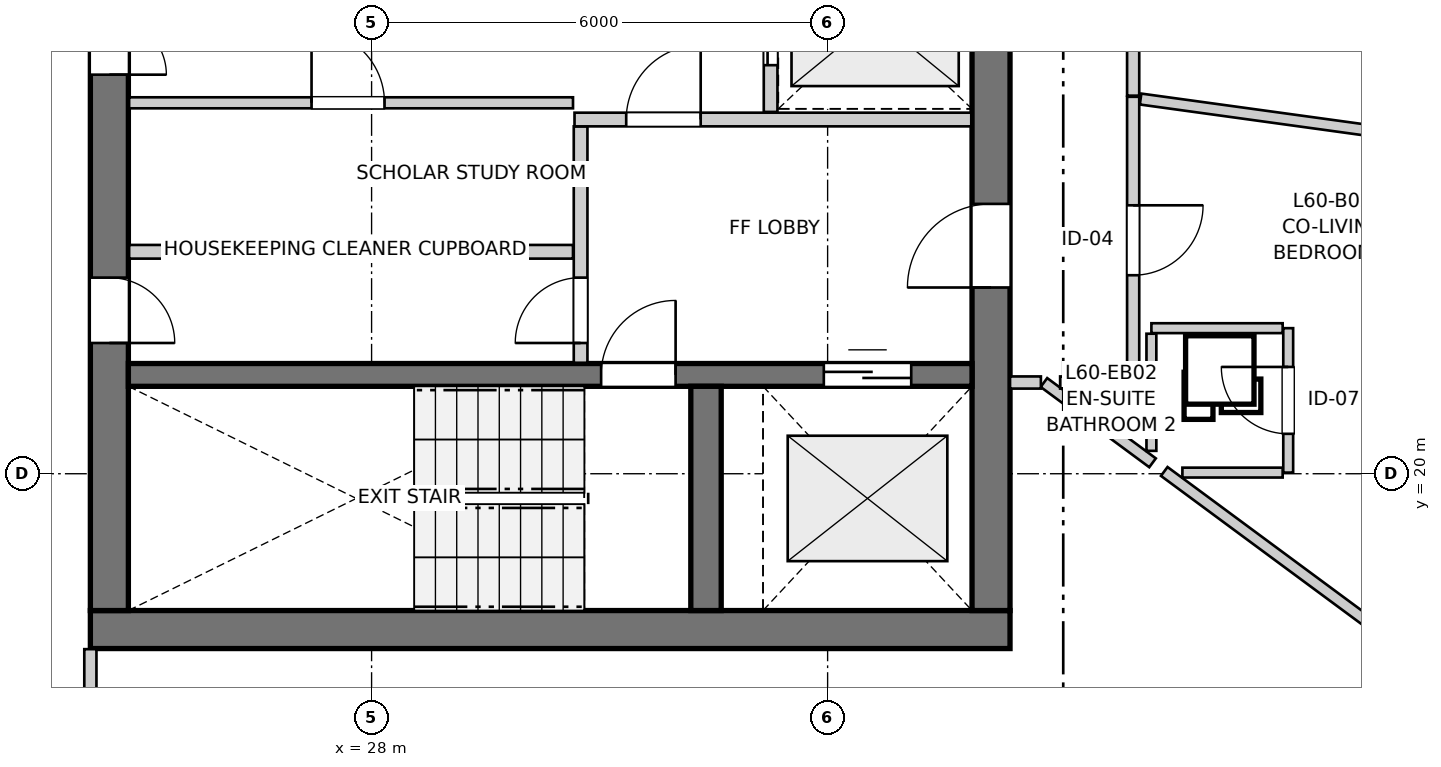
"""IFC4 building model, lengths in metres.
Left out: names, types, materials, properties, quantities, classifications, styles, units other than length and angle.
Written with IfcOpenShell. Run it as: python <this file> out.ifc"""

import sys

from ifc_helpers import new_model, si_unit, direction, frame, frame_2d, origin, place, context, subcontext, project, spatial, rectangle, extrude, source, transform, mapped, element, fill, save


model = new_model("IFC4")
c1 = context("Model", 3, precision=1e-05, world=origin(), true_north=direction((0.0, 1.0)))
c2 = subcontext(c1, "Body", "Model", "MODEL_VIEW")
j1 = project(units=[si_unit("LENGTHUNIT", "METRE"), si_unit("PLANEANGLEUNIT", "RADIAN")], contexts=[c1])
p1 = place(None, origin())
s1 = spatial("IfcSite", under=j1, at=p1, CompositionType="ELEMENT")
p2 = place(p1, origin())
s2 = spatial("IfcBuilding", under=s1, at=p2, CompositionType="ELEMENT")
p3 = place(p2, frame((0.0, 0.0, 202.0)))
s3 = spatial("IfcBuildingStorey", under=s2, at=p3, CompositionType="ELEMENT", Elevation=202.0)
p4 = place(p3, frame((24.3, 17.95, 0.0), z_axis=(0.0, 0.0, 1.0), x_axis=(1.0, 0.0, 0.0)))
e1 = element("IfcWall", 1, at=p4, inside=s3, PredefinedType="SHEAR", context=c2, shape_type="SweptSolid", body=[
    extrude(rectangle(XDim=12.1, YDim=0.5, at=frame_2d((6.05, 0.0))), origin(), (0.0, 0.0, 1.0), 2.935),
])
p5 = place(p3, frame((24.55, 33.8, 0.0), z_axis=(0.0, 0.0, 1.0), x_axis=(0.0, -1.0, 0.0)))
e2 = element("IfcWall", 2, at=p5, inside=s3, PredefinedType="SHEAR", context=c2, shape_type="SweptSolid", body=[
    extrude(rectangle(XDim=15.6, YDim=0.5, at=frame_2d((7.8, 0.0))), origin(), (0.0, 0.0, 1.0), 2.935),
])
p6 = place(p5, frame((7.05, 0.0, 0.0)))
e3 = element("IfcOpeningElement", 3, at=p6, cuts=e2, PredefinedType="OPENING", context=c2, shape_type="SweptSolid", body=[
    extrude(rectangle(XDim=1.5, YDim=2.15, at=frame_2d((0.75, 1.075))), frame((0.0, 0.26, 0.0), z_axis=(0.0, -1.0, 0.0), x_axis=(1.0, 0.0, 0.0)), (0.0, 0.0, 1.0), 0.52),
])
p7 = place(p5, frame((3.52, 0.0, 0.0)))
e4 = element("IfcOpeningElement", 4, at=p7, cuts=e2, PredefinedType="OPENING", context=c2, shape_type="SweptSolid", body=[
    extrude(rectangle(XDim=0.86, YDim=2.05, at=frame_2d((0.43, 1.025))), frame((0.0, 0.26, 0.0), z_axis=(0.0, -1.0, 0.0), x_axis=(1.0, 0.0, 0.0)), (0.0, 0.0, 1.0), 0.52),
])
p8 = place(p5, frame((11.22, 0.0, 0.0)))
e5 = element("IfcOpeningElement", 5, at=p8, cuts=e2, PredefinedType="OPENING", context=c2, shape_type="SweptSolid", body=[
    extrude(rectangle(XDim=0.86, YDim=2.05, at=frame_2d((0.43, 1.025))), frame((0.0, 0.26, 0.0), z_axis=(0.0, -1.0, 0.0), x_axis=(1.0, 0.0, 0.0)), (0.0, 0.0, 1.0), 0.52),
])
p9 = place(p3, frame((36.15, 18.2, 0.0), z_axis=(0.0, 0.0, 1.0), x_axis=(0.0, 1.0, 0.0)))
e6 = element("IfcWall", 6, at=p9, inside=s3, PredefinedType="SHEAR", context=c2, shape_type="SweptSolid", body=[
    extrude(rectangle(XDim=15.6, YDim=0.5, at=frame_2d((7.8, 0.0))), origin(), (0.0, 0.0, 1.0), 2.935),
])
p10 = place(p9, frame((4.25, 0.0, 0.0)))
e7 = element("IfcOpeningElement", 7, at=p10, cuts=e6, PredefinedType="OPENING", context=c2, shape_type="SweptSolid", body=[
    extrude(rectangle(XDim=1.1, YDim=2.15, at=frame_2d((0.55, 1.075))), frame((0.0, 0.26, 0.0), z_axis=(0.0, -1.0, 0.0), x_axis=(1.0, 0.0, 0.0)), (0.0, 0.0, 1.0), 0.52),
])
p11 = place(p9, frame((10.25, 0.0, 0.0)))
e8 = element("IfcOpeningElement", 8, at=p11, cuts=e6, PredefinedType="OPENING", context=c2, shape_type="SweptSolid", body=[
    extrude(rectangle(XDim=1.1, YDim=2.15, at=frame_2d((0.55, 1.075))), frame((0.0, 0.26, 0.0), z_axis=(0.0, -1.0, 0.0), x_axis=(1.0, 0.0, 0.0)), (0.0, 0.0, 1.0), 0.52),
])
p12 = place(p3, frame((24.8, 21.3, 0.0), z_axis=(0.0, 0.0, 1.0), x_axis=(1.0, 0.0, 0.0)))
e9 = element("IfcWall", 9, at=p12, inside=s3, PredefinedType="SHEAR", context=c2, shape_type="SweptSolid", body=[
    extrude(rectangle(XDim=11.1, YDim=0.3, at=frame_2d((5.55, 0.0))), origin(), (0.0, 0.0, 1.0), 2.935),
])
p13 = place(p12, frame((6.22, 0.0, 0.0)))
e10 = element("IfcOpeningElement", 10, at=p13, cuts=e9, PredefinedType="OPENING", context=c2, shape_type="SweptSolid", body=[
    extrude(rectangle(XDim=0.98, YDim=2.15, at=frame_2d((0.49, 1.075))), frame((0.0, 0.16, 0.0), z_axis=(0.0, -1.0, 0.0), x_axis=(1.0, 0.0, 0.0)), (0.0, 0.0, 1.0), 0.32),
])
p14 = place(p12, frame((9.15, 0.0, 0.0)))
e11 = element("IfcOpeningElement", 11, at=p14, cuts=e9, PredefinedType="OPENING", context=c2, shape_type="SweptSolid", body=[
    extrude(rectangle(XDim=1.15, YDim=2.15, at=frame_2d((0.575, 1.075))), frame((0.0, 0.16, 0.0), z_axis=(0.0, -1.0, 0.0), x_axis=(1.0, 0.0, 0.0)), (0.0, 0.0, 1.0), 0.32),
])
p15 = place(p3, frame((32.4, 18.2, 0.0), z_axis=(0.0, 0.0, 1.0), x_axis=(0.0, 1.0, 0.0)))
e12 = element("IfcWall", 12, at=p15, inside=s3, PredefinedType="SHEAR", context=c2, shape_type="SweptSolid", body=[
    extrude(rectangle(XDim=2.95, YDim=0.4, at=frame_2d((1.475, 0.0))), origin(), (0.0, 0.0, 1.0), 2.935),
])
p16 = place(p3, frame((41.107, 16.748, 0.0), z_axis=(0.0, 0.0, 1.0), x_axis=(0.257000958827, 0.966411148095, 0.0)))
e13 = element("IfcWall", 13, at=p16, inside=s3, PredefinedType="SOLIDWALL", context=c2, shape_type="SweptSolid", body=[
    extrude(rectangle(XDim=2.343, YDim=0.32, at=frame_2d((1.171, 0.0))), origin(), (0.0, 0.0, 1.0), 2.555),
])
p17 = place(p16, frame((0.343, 0.0, 0.82)))
e14 = element("IfcOpeningElement", 14, at=p17, cuts=e13, PredefinedType="OPENING", context=c2, shape_type="SweptSolid", body=[
    extrude(rectangle(XDim=0.58, YDim=1.35, at=frame_2d((0.29, 0.675))), frame((0.0, 0.17, 0.0), z_axis=(0.0, -1.0, 0.0), x_axis=(1.0, 0.0, 0.0)), (0.0, 0.0, 1.0), 0.34),
])
p18 = place(p16, frame((1.399, 0.0, 0.82)))
e15 = element("IfcOpeningElement", 15, at=p18, cuts=e13, PredefinedType="OPENING", context=c2, shape_type="SweptSolid", body=[
    extrude(rectangle(XDim=0.58, YDim=1.35, at=frame_2d((0.29, 0.675))), frame((0.0, 0.17, 0.0), z_axis=(0.0, -1.0, 0.0), x_axis=(1.0, 0.0, 0.0)), (0.0, 0.0, 1.0), 0.34),
])
p19 = place(p3, frame((30.75, 21.46, 0.0), z_axis=(0.0, 0.0, 1.0), x_axis=(0.0, 1.0, 0.0)))
e16 = element("IfcWall", 16, at=p19, inside=s3, PredefinedType="PARTITIONING", context=c2, shape_type="SweptSolid", body=[
    extrude(rectangle(XDim=3.11, YDim=0.18, at=frame_2d((1.555, 0.0))), origin(), (0.0, 0.0, 1.0), 2.935),
])
p20 = place(p19, frame((0.26, 0.0, 0.0)))
e17 = element("IfcOpeningElement", 17, at=p20, cuts=e16, PredefinedType="OPENING", context=c2, shape_type="SweptSolid", body=[
    extrude(rectangle(XDim=0.86, YDim=2.05, at=frame_2d((0.43, 1.025))), frame((0.0, 0.1, 0.0), z_axis=(0.0, -1.0, 0.0), x_axis=(1.0, 0.0, 0.0)), (0.0, 0.0, 1.0), 0.2),
])
p21 = place(p3, frame((30.67, 24.66, 0.0), z_axis=(0.0, 0.0, 1.0), x_axis=(1.0, 0.0, 0.0)))
e18 = element("IfcWall", 18, at=p21, inside=s3, PredefinedType="PARTITIONING", context=c2, shape_type="SweptSolid", body=[
    extrude(rectangle(XDim=5.22, YDim=0.18, at=frame_2d((2.61, 0.0))), origin(), (0.0, 0.0, 1.0), 2.935),
])
p22 = place(p21, frame((0.68, 0.0, 0.0)))
e19 = element("IfcOpeningElement", 19, at=p22, cuts=e18, PredefinedType="OPENING", context=c2, shape_type="SweptSolid", body=[
    extrude(rectangle(XDim=0.98, YDim=2.15, at=frame_2d((0.49, 1.075))), frame((0.0, 0.1, 0.0), z_axis=(0.0, -1.0, 0.0), x_axis=(1.0, 0.0, 0.0)), (0.0, 0.0, 1.0), 0.2),
])
p23 = place(p3, frame((33.25, 24.76, 0.0), z_axis=(0.0, 0.0, 1.0), x_axis=(0.0, 1.0, 0.0)))
e20 = element("IfcWall", 20, at=p23, inside=s3, PredefinedType="PARTITIONING", context=c2, shape_type="SweptSolid", body=[
    extrude(rectangle(XDim=2.48, YDim=0.18, at=frame_2d((1.24, 0.0))), origin(), (0.0, 0.0, 1.0), 2.935),
])
p24 = place(p23, frame((0.615, 0.0, 0.0)))
e21 = element("IfcOpeningElement", 21, at=p24, cuts=e20, PredefinedType="OPENING", context=c2, shape_type="SweptSolid", body=[
    extrude(rectangle(XDim=1.25, YDim=2.15, at=frame_2d((0.625, 1.075))), frame((0.0, 0.1, 0.0), z_axis=(0.0, -1.0, 0.0), x_axis=(1.0, 0.0, 0.0)), (0.0, 0.0, 1.0), 0.2),
])
p25 = place(p3, frame((24.81, 22.92, 0.0), z_axis=(0.0, 0.0, 1.0), x_axis=(1.0, 0.0, 0.0)))
e22 = element("IfcWall", 22, at=p25, inside=s3, PredefinedType="PARTITIONING", context=c2, shape_type="SweptSolid", body=[
    extrude(rectangle(XDim=5.84, YDim=0.18, at=frame_2d((2.92, 0.0))), origin(), (0.0, 0.0, 1.0), 2.935),
])
p26 = place(p3, frame((24.81, 24.88, 0.0), z_axis=(0.0, 0.0, 1.0), x_axis=(1.0, 0.0, 0.0)))
e23 = element("IfcWall", 23, at=p26, inside=s3, PredefinedType="PARTITIONING", context=c2, shape_type="SweptSolid", body=[
    extrude(rectangle(XDim=5.84, YDim=0.145, at=frame_2d((2.92, 0.0))), origin(), (0.0, 0.0, 1.0), 2.935),
])
p27 = place(p26, frame((2.4, 0.0, 0.0)))
e24 = element("IfcOpeningElement", 24, at=p27, cuts=e23, PredefinedType="OPENING", context=c2, shape_type="SweptSolid", body=[
    extrude(rectangle(XDim=0.96, YDim=2.1, at=frame_2d((0.48, 1.05))), frame((0.0, 0.083, 0.0), z_axis=(0.0, -1.0, 0.0), x_axis=(1.0, 0.0, 0.0)), (0.0, 0.0, 1.0), 0.165),
])
p28 = place(p3, frame((38.02, 24.959, 0.0), z_axis=(0.0, 0.0, 1.0), x_axis=(0.0, -1.0, 0.0)))
e25 = element("IfcWall", 25, at=p28, inside=s3, PredefinedType="PARTITIONING", context=c2, shape_type="SweptSolid", body=[
    extrude(rectangle(XDim=3.759, YDim=0.16, at=frame_2d((1.879, 0.0))), origin(), (0.0, 0.0, 1.0), 2.935),
])
p29 = place(p28, frame((1.427, 0.0, 0.0)))
e26 = element("IfcOpeningElement", 26, at=p29, cuts=e25, PredefinedType="OPENING", context=c2, shape_type="SweptSolid", body=[
    extrude(rectangle(XDim=0.92, YDim=2.1, at=frame_2d((0.46, 1.05))), frame((0.0, 0.09, 0.0), z_axis=(0.0, -1.0, 0.0), x_axis=(1.0, 0.0, 0.0)), (0.0, 0.0, 1.0), 0.18),
])
p30 = place(p3, frame((38.02, 27.813, 0.0), z_axis=(0.0, 0.0, 1.0), x_axis=(0.0, -1.0, 0.0)))
e27 = element("IfcWall", 27, at=p30, inside=s3, PredefinedType="PARTITIONING", context=c2, shape_type="SweptSolid", body=[
    extrude(rectangle(XDim=2.839, YDim=0.16, at=frame_2d((1.419, 0.0))), origin(), (0.0, 0.0, 1.0), 2.935),
])
p31 = place(p30, frame((0.77, 0.0, 0.0)))
e28 = element("IfcOpeningElement", 28, at=p31, cuts=e27, PredefinedType="OPENING", context=c2, shape_type="SweptSolid", body=[
    extrude(rectangle(XDim=1.3, YDim=2.1, at=frame_2d((0.65, 1.05))), frame((0.0, 0.09, 0.0), z_axis=(0.0, -1.0, 0.0), x_axis=(1.0, 0.0, 0.0)), (0.0, 0.0, 1.0), 0.18),
])
p32 = place(p3, frame((24.3, 17.692, 0.0), z_axis=(0.0, 0.0, 1.0), x_axis=(0.0, -1.0, 0.0)))
e29 = element("IfcWall", 29, at=p32, inside=s3, PredefinedType="PARTITIONING", context=c2, shape_type="SweptSolid", body=[
    extrude(rectangle(XDim=2.731, YDim=0.16, at=frame_2d((1.365, 0.0))), origin(), (0.0, 0.0, 1.0), 2.935),
])
p33 = place(p32, frame((0.882, 0.0, 0.0)))
e30 = element("IfcOpeningElement", 30, at=p33, cuts=e29, PredefinedType="OPENING", context=c2, shape_type="SweptSolid", body=[
    extrude(rectangle(XDim=0.96, YDim=2.1, at=frame_2d((0.48, 1.05))), frame((0.0, 0.09, 0.0), z_axis=(0.0, -1.0, 0.0), x_axis=(1.0, 0.0, 0.0)), (0.0, 0.0, 1.0), 0.18),
])
p34 = place(p3, frame((40.06, 20.015, 0.0), z_axis=(0.0, 0.0, 1.0), x_axis=(0.0, 1.0, 0.0)))
e31 = element("IfcWall", 31, at=p34, inside=s3, PredefinedType="PARTITIONING", context=c2, shape_type="SweptSolid", body=[
    extrude(rectangle(XDim=1.9, YDim=0.13, at=frame_2d((0.95, 0.0))), origin(), (0.0, 0.0, 1.0), 2.573),
])
p35 = place(p34, frame((0.51, 0.0, 0.0)))
e32 = element("IfcOpeningElement", 32, at=p35, cuts=e31, PredefinedType="OPENING", context=c2, shape_type="SweptSolid", body=[
    extrude(rectangle(XDim=0.88, YDim=2.05, at=frame_2d((0.44, 1.025))), frame((0.0, 0.075, 0.0), z_axis=(0.0, -1.0, 0.0), x_axis=(1.0, 0.0, 0.0)), (0.0, 0.0, 1.0), 0.15),
])
p36 = place(p3, frame((38.118, 24.929, 0.0), z_axis=(0.0, 0.0, 1.0), x_axis=(0.990658246077, -0.136368029533, 0.0)))
e33 = element("IfcWall", 33, at=p36, inside=s3, PredefinedType="PARTITIONING", context=c2, shape_type="SweptSolid", body=[
    extrude(rectangle(XDim=4.202, YDim=0.145, at=frame_2d((2.101, 0.0))), origin(), (0.0, 0.0, 1.0), 2.935),
])
p37 = place(p3, frame((38.429, 20.03, 0.0), z_axis=(0.0, 0.0, 1.0), x_axis=(0.804249944798, -0.594291196546, 0.0)))
e34 = element("IfcWall", 34, at=p37, inside=s3, PredefinedType="PARTITIONING", context=c2, shape_type="SweptSolid", body=[
    extrude(rectangle(XDim=3.506, YDim=0.145, at=frame_2d((1.753, 0.0))), origin(), (0.0, 0.0, 1.0), 2.935),
])
p38 = place(p3, frame((38.26, 21.915, 0.0), z_axis=(0.0, 0.0, 1.0), x_axis=(1.0, 0.0, 0.0)))
e35 = element("IfcWall", 35, at=p38, inside=s3, PredefinedType="PARTITIONING", context=c2, shape_type="SweptSolid", body=[
    extrude(rectangle(XDim=1.727, YDim=0.13, at=frame_2d((0.864, 0.0))), origin(), (0.0, 0.0, 1.0), 2.935),
])
p39 = place(p3, frame((36.846, 21.2, 0.0), z_axis=(0.0, 0.0, 1.0), x_axis=(0.804250382672, -0.594290603974, 0.0)))
e36 = element("IfcWall", 36, at=p39, inside=s3, PredefinedType="PARTITIONING", context=c2, shape_type="SweptSolid", body=[
    extrude(rectangle(XDim=1.777, YDim=0.145, at=frame_2d((0.888, 0.0))), origin(), (0.0, 0.0, 1.0), 2.935),
])
p40 = place(p3, frame((38.26, 20.301, 0.0), z_axis=(0.0, 0.0, 1.0), x_axis=(0.0, 1.0, 0.0)))
e37 = element("IfcWall", 37, at=p40, inside=s3, PredefinedType="PARTITIONING", context=c2, shape_type="SweptSolid", body=[
    extrude(rectangle(XDim=1.541, YDim=0.13, at=frame_2d((0.771, 0.0))), origin(), (0.0, 0.0, 1.0), 2.603),
])
p41 = place(p3, frame((38.668, 20.015, 0.0), z_axis=(0.0, 0.0, 1.0), x_axis=(1.0, 0.0, 0.0)))
e38 = element("IfcWall", 38, at=p41, inside=s3, PredefinedType="PARTITIONING", context=c2, shape_type="SweptSolid", body=[
    extrude(rectangle(XDim=1.319, YDim=0.13, at=frame_2d((0.66, 0.0))), origin(), (0.0, 0.0, 1.0), 2.935),
])
p42 = place(p3, frame((37.059, 21.2, 0.0), z_axis=(0.0, 0.0, 1.0), x_axis=(1.0, 0.0, 0.0)))
e39 = element("IfcWall", 39, at=p42, inside=s3, PredefinedType="PARTITIONING", context=c2, shape_type="SweptSolid", body=[
    extrude(rectangle(XDim=0.873, YDim=0.16, at=frame_2d((0.437, 0.0))), origin(), (0.0, 0.0, 1.0), 2.935),
])
p43 = place(p3, frame((36.4, 21.2, 0.0), z_axis=(0.0, 0.0, 1.0), x_axis=(1.0, 0.0, 0.0)))
e40 = element("IfcWall", 40, at=p43, inside=s3, PredefinedType="PARTITIONING", context=c2, shape_type="SweptSolid", body=[
    extrude(rectangle(XDim=0.406, YDim=0.16, at=frame_2d((0.203, 0.0))), origin(), (0.0, 0.0, 1.0), 2.935),
])
m1 = source(origin(), c2, "Body", "SweptSolid", [
    extrude(rectangle(XDim=0.98, YDim=2.15, at=frame_2d((0.49, 1.075))), frame((0.0, 0.025, 0.0), z_axis=(0.0, -1.0, 0.0), x_axis=(1.0, 0.0, 0.0)), (0.0, 0.0, 1.0), 0.05),
])
p44 = place(p13, origin())
e41 = element("IfcDoor", 41, at=p44, inside=s3, OperationType="SINGLE_SWING_RIGHT", PredefinedType="DOOR", context=c2, shape_type="MappedRepresentation", body=[
    mapped(m1, transform((0.0, 0.0, 0.0), x_axis=(1.0, 0.0, 0.0), y_axis=(0.0, 1.0, 0.0), z_axis=(0.0, 0.0, 1.0), scale=1.0)),
])
fill(e10, e41)
m2 = source(origin(), c2, "Body", "SweptSolid", [
    extrude(rectangle(XDim=1.15, YDim=2.15, at=frame_2d((0.575, 1.075))), frame((0.0, 0.025, 0.0), z_axis=(0.0, -1.0, 0.0), x_axis=(1.0, 0.0, 0.0)), (0.0, 0.0, 1.0), 0.05),
])
p45 = place(p14, origin())
e42 = element("IfcDoor", 42, at=p45, inside=s3, OperationType="DOUBLE_DOOR_SLIDING", PredefinedType="DOOR", context=c2, shape_type="MappedRepresentation", body=[
    mapped(m2, transform((0.0, 0.0, 0.0), x_axis=(1.0, 0.0, 0.0), y_axis=(0.0, 1.0, 0.0), z_axis=(0.0, 0.0, 1.0), scale=1.0)),
])
fill(e11, e42)
m3 = source(origin(), c2, "Body", "SweptSolid", [
    extrude(rectangle(XDim=1.1, YDim=2.15, at=frame_2d((0.55, 1.075))), frame((0.0, 0.025, 0.0), z_axis=(0.0, -1.0, 0.0), x_axis=(1.0, 0.0, 0.0)), (0.0, 0.0, 1.0), 0.05),
])
p46 = place(p10, origin())
e43 = element("IfcDoor", 43, at=p46, inside=s3, OperationType="SINGLE_SWING_LEFT", PredefinedType="DOOR", context=c2, shape_type="MappedRepresentation", body=[
    mapped(m3, transform((0.0, 0.0, 0.0), x_axis=(1.0, 0.0, 0.0), y_axis=(0.0, 1.0, 0.0), z_axis=(0.0, 0.0, 1.0), scale=1.0)),
])
fill(e7, e43)
m4 = source(origin(), c2, "Body", "SweptSolid", [
    extrude(rectangle(XDim=1.5, YDim=2.15, at=frame_2d((0.75, 1.075))), frame((0.0, 0.025, 0.0), z_axis=(0.0, -1.0, 0.0), x_axis=(1.0, 0.0, 0.0)), (0.0, 0.0, 1.0), 0.05),
])
p47 = place(p6, origin())
e44 = element("IfcDoor", 44, at=p47, inside=s3, OperationType="DOUBLE_DOOR_SINGLE_SWING", PredefinedType="DOOR", context=c2, shape_type="MappedRepresentation", body=[
    mapped(m4, transform((0.0, 0.0, 0.0), x_axis=(1.0, 0.0, 0.0), y_axis=(0.0, 1.0, 0.0), z_axis=(0.0, 0.0, 1.0), scale=1.0)),
])
fill(e3, e44)
m5 = source(origin(), c2, "Body", "SweptSolid", [
    extrude(rectangle(XDim=0.86, YDim=2.05, at=frame_2d((0.43, 1.025))), frame((0.0, 0.025, 0.0), z_axis=(0.0, -1.0, 0.0), x_axis=(1.0, 0.0, 0.0)), (0.0, 0.0, 1.0), 0.05),
])
p48 = place(p8, origin())
e45 = element("IfcDoor", 45, at=p48, inside=s3, OperationType="SINGLE_SWING_RIGHT", PredefinedType="DOOR", context=c2, shape_type="MappedRepresentation", body=[
    mapped(m5, transform((0.0, 0.0, 0.0), x_axis=(1.0, 0.0, 0.0), y_axis=(0.0, 1.0, 0.0), z_axis=(0.0, 0.0, 1.0), scale=1.0)),
])
fill(e5, e45)
p49 = place(p20, origin())
e46 = element("IfcDoor", 46, at=p49, inside=s3, OperationType="SINGLE_SWING_LEFT", PredefinedType="DOOR", context=c2, shape_type="MappedRepresentation", body=[
    mapped(m5, transform((0.0, 0.0, 0.0), x_axis=(1.0, 0.0, 0.0), y_axis=(0.0, 1.0, 0.0), z_axis=(0.0, 0.0, 1.0), scale=1.0)),
])
fill(e17, e46)
p50 = place(p22, origin())
e47 = element("IfcDoor", 47, at=p50, inside=s3, OperationType="SINGLE_SWING_RIGHT", PredefinedType="DOOR", context=c2, shape_type="MappedRepresentation", body=[
    mapped(m1, transform((0.0, 0.0, 0.0), x_axis=(1.0, 0.0, 0.0), y_axis=(0.0, 1.0, 0.0), z_axis=(0.0, 0.0, 1.0), scale=1.0)),
])
fill(e19, e47)
m6 = source(origin(), c2, "Body", "SweptSolid", [
    extrude(rectangle(XDim=1.25, YDim=2.15, at=frame_2d((0.625, 1.075))), frame((0.0, 0.025, 0.0), z_axis=(0.0, -1.0, 0.0), x_axis=(1.0, 0.0, 0.0)), (0.0, 0.0, 1.0), 0.05),
])
p51 = place(p24, origin())
e48 = element("IfcDoor", 48, at=p51, inside=s3, OperationType="DOUBLE_DOOR_SLIDING", PredefinedType="DOOR", context=c2, shape_type="MappedRepresentation", body=[
    mapped(m6, transform((0.0, 0.0, 0.0), x_axis=(1.0, 0.0, 0.0), y_axis=(0.0, 1.0, 0.0), z_axis=(0.0, 0.0, 1.0), scale=1.0)),
])
fill(e21, e48)
m7 = source(origin(), c2, "Body", "SweptSolid", [
    extrude(rectangle(XDim=0.96, YDim=2.1, at=frame_2d((0.48, 1.05))), frame((0.0, 0.025, 0.0), z_axis=(0.0, -1.0, 0.0), x_axis=(1.0, 0.0, 0.0)), (0.0, 0.0, 1.0), 0.05),
])
p52 = place(p27, origin())
e49 = element("IfcDoor", 49, at=p52, inside=s3, OperationType="SINGLE_SWING_LEFT", PredefinedType="DOOR", context=c2, shape_type="MappedRepresentation", body=[
    mapped(m7, transform((0.0, 0.0, 0.0), x_axis=(1.0, 0.0, 0.0), y_axis=(0.0, 1.0, 0.0), z_axis=(0.0, 0.0, 1.0), scale=1.0)),
])
fill(e24, e49)
m8 = source(origin(), c2, "Body", "SweptSolid", [
    extrude(rectangle(XDim=0.92, YDim=2.1, at=frame_2d((0.46, 1.05))), frame((0.0, 0.025, 0.0), z_axis=(0.0, -1.0, 0.0), x_axis=(1.0, 0.0, 0.0)), (0.0, 0.0, 1.0), 0.05),
])
p53 = place(p29, origin())
e50 = element("IfcDoor", 50, at=p53, inside=s3, OperationType="SINGLE_SWING_LEFT", PredefinedType="DOOR", context=c2, shape_type="MappedRepresentation", body=[
    mapped(m8, transform((0.0, 0.0, 0.0), x_axis=(1.0, 0.0, 0.0), y_axis=(0.0, 1.0, 0.0), z_axis=(0.0, 0.0, 1.0), scale=1.0)),
])
fill(e26, e50)
m9 = source(origin(), c2, "Body", "SweptSolid", [
    extrude(rectangle(XDim=0.88, YDim=2.05, at=frame_2d((0.44, 1.025))), frame((0.0, 0.025, 0.0), z_axis=(0.0, -1.0, 0.0), x_axis=(1.0, 0.0, 0.0)), (0.0, 0.0, 1.0), 0.05),
])
p54 = place(p35, origin())
e51 = element("IfcDoor", 51, at=p54, inside=s3, OperationType="SINGLE_SWING_RIGHT", PredefinedType="DOOR", context=c2, shape_type="MappedRepresentation", body=[
    mapped(m9, transform((0.0, 0.0, 0.0), x_axis=(1.0, 0.0, 0.0), y_axis=(0.0, 1.0, 0.0), z_axis=(0.0, 0.0, 1.0), scale=1.0)),
])
fill(e32, e51)
save(model, sys.argv[1])
